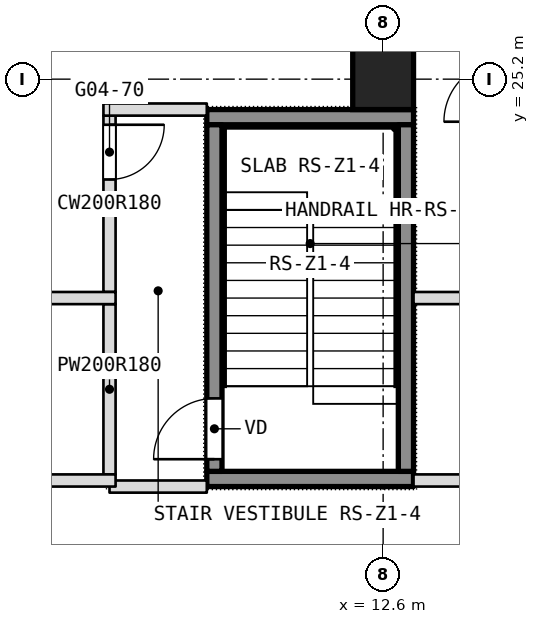
"""IFC4 building model, lengths in metres.
Left out: names, types, materials, properties, quantities, classifications, styles, units other than length and angle.
Written with IfcOpenShell. Run it as: python <this file> out.ifc"""

import sys

from ifc_helpers import new_model, si_unit, direction, frame, frame_2d, origin, origin_2d, place, context, subcontext, project, spatial, rectangle, extrude, element, fill, save


model = new_model("IFC4")
c1 = context("Model", 3, precision=1e-05, world=origin(), true_north=direction((0.0, 1.0)))
c2 = subcontext(c1, "Body", "Model", "MODEL_VIEW")
j1 = project(units=[si_unit("LENGTHUNIT", "METRE"), si_unit("PLANEANGLEUNIT", "RADIAN")], contexts=[c1])
p1 = place(None, origin())
s1 = spatial("IfcSite", under=j1, at=p1, CompositionType="ELEMENT")
p2 = place(p1, origin())
s2 = spatial("IfcBuilding", under=s1, at=p2, CompositionType="ELEMENT")
p3 = place(p2, frame((0.0, 0.0, 58.1)))
s3 = spatial("IfcBuildingStorey", under=s2, at=p3, CompositionType="ELEMENT", Elevation=58.1)
p4 = place(p3, frame((12.6, 25.2, 0.0), z_axis=(0.0, 0.0, 1.0), x_axis=(1.0, 0.0, 0.0)))
e1 = element("IfcColumn", 1, at=p4, inside=s3, PredefinedType="COLUMN", context=c2, shape_type="SweptSolid", body=[
    extrude(rectangle(XDim=1.0, YDim=1.0, at=origin_2d()), origin(), (0.0, 0.0, 1.0), 3.6),
])
p5 = place(p3, frame((8.1, 18.7, 0.0), z_axis=(0.0, 0.0, 1.0), x_axis=(0.0, 1.0, 0.0)))
e2 = element("IfcWall", 2, at=p5, inside=s3, PredefinedType="PARTITIONING", context=c2, shape_type="SweptSolid", body=[
    extrude(rectangle(XDim=2.8, YDim=0.2, at=frame_2d((1.4, 0.0))), origin(), (0.0, 0.0, 1.0), 3.34),
])
p6 = place(p3, frame((8.1, 21.7, 0.0), z_axis=(0.0, 0.0, 1.0), x_axis=(0.0, 1.0, 0.0)))
e3 = element("IfcWall", 3, at=p6, inside=s3, PredefinedType="PARTITIONING", context=c2, shape_type="SweptSolid", body=[
    extrude(rectangle(XDim=2.9, YDim=0.2, at=frame_2d((1.45, 0.0))), origin(), (0.0, 0.0, 1.0), 3.34),
])
p7 = place(p6, frame((1.85, 0.0, 0.0)))
e4 = element("IfcOpeningElement", 4, at=p7, cuts=e3, PredefinedType="OPENING", context=c2, shape_type="SweptSolid", body=[
    extrude(rectangle(XDim=0.9, YDim=2.1, at=frame_2d((0.45, 1.05))), frame((0.0, 0.1, 0.0), z_axis=(0.0, -1.0, 0.0), x_axis=(1.0, 0.0, 0.0)), (0.0, 0.0, 1.0), 0.2),
])
p8 = place(p3, frame((8.1, 18.5, 0.0), z_axis=(0.0, 0.0, 1.0), x_axis=(1.0, 0.0, 0.0)))
e5 = element("IfcWall", 5, at=p8, inside=s3, PredefinedType="PARTITIONING", context=c2, shape_type="SweptSolid", body=[
    extrude(rectangle(XDim=1.6, YDim=0.2, at=frame_2d((0.8, 0.0))), origin(), (0.0, 0.0, 1.0), 3.34),
])
p9 = place(p3, frame((-16.9, 18.6, 0.0), z_axis=(0.0, 0.0, 1.0), x_axis=(1.0, 0.0, 0.0)))
e6 = element("IfcWall", 6, at=p9, inside=s3, PredefinedType="PARTITIONING", context=c2, shape_type="SweptSolid", body=[
    extrude(rectangle(XDim=25.1, YDim=0.2, at=frame_2d((12.55, 0.0))), origin(), (0.0, 0.0, 1.0), 3.34),
])
p10 = place(p9, frame((1.7, 0.0, 0.0)))
e7 = element("IfcOpeningElement", 7, at=p10, cuts=e6, PredefinedType="OPENING", context=c2, shape_type="SweptSolid", body=[
    extrude(rectangle(XDim=1.0, YDim=2.1, at=frame_2d((0.5, 1.05))), frame((0.0, 0.1, 0.0), z_axis=(0.0, -1.0, 0.0), x_axis=(1.0, 0.0, 0.0)), (0.0, 0.0, 1.0), 0.2),
])
p11 = place(p9, frame((16.0, 0.0, 0.0)))
e8 = element("IfcOpeningElement", 8, at=p11, cuts=e6, PredefinedType="OPENING", context=c2, shape_type="SweptSolid", body=[
    extrude(rectangle(XDim=1.8, YDim=2.1, at=frame_2d((0.9, 1.05))), frame((0.0, 0.1, 0.0), z_axis=(0.0, -1.0, 0.0), x_axis=(1.0, 0.0, 0.0)), (0.0, 0.0, 1.0), 0.2),
])
p12 = place(p9, frame((22.55, 0.0, 0.0)))
e9 = element("IfcOpeningElement", 9, at=p12, cuts=e6, PredefinedType="OPENING", context=c2, shape_type="SweptSolid", body=[
    extrude(rectangle(XDim=1.0, YDim=2.1, at=frame_2d((0.5, 1.05))), frame((0.0, 0.1, 0.0), z_axis=(0.0, -1.0, 0.0), x_axis=(1.0, 0.0, 0.0)), (0.0, 0.0, 1.0), 0.2),
])
p13 = place(p9, frame((5.9, 0.0, 0.0)))
e10 = element("IfcOpeningElement", 10, at=p13, cuts=e6, PredefinedType="OPENING", context=c2, shape_type="SweptSolid", body=[
    extrude(rectangle(XDim=1.0, YDim=2.1, at=frame_2d((0.5, 1.05))), frame((0.0, 0.1, 0.0), z_axis=(0.0, -1.0, 0.0), x_axis=(1.0, 0.0, 0.0)), (0.0, 0.0, 1.0), 0.2),
])
p14 = place(p9, frame((10.1, 0.0, 0.0)))
e11 = element("IfcOpeningElement", 11, at=p14, cuts=e6, PredefinedType="OPENING", context=c2, shape_type="SweptSolid", body=[
    extrude(rectangle(XDim=1.0, YDim=2.1, at=frame_2d((0.5, 1.05))), frame((0.0, 0.1, 0.0), z_axis=(0.0, -1.0, 0.0), x_axis=(1.0, 0.0, 0.0)), (0.0, 0.0, 1.0), 0.2),
])
p15 = place(p3, frame((13.1, 18.6, 0.0), z_axis=(0.0, 0.0, 1.0), x_axis=(1.0, 0.0, 0.0)))
e12 = element("IfcWall", 12, at=p15, inside=s3, PredefinedType="PARTITIONING", context=c2, shape_type="SweptSolid", body=[
    extrude(rectangle(XDim=3.8, YDim=0.2, at=frame_2d((1.9, 0.0))), origin(), (0.0, 0.0, 1.0), 3.34),
])
p16 = place(p15, frame((1.35, 0.0, 0.0)))
e13 = element("IfcOpeningElement", 13, at=p16, cuts=e12, PredefinedType="OPENING", context=c2, shape_type="SweptSolid", body=[
    extrude(rectangle(XDim=1.0, YDim=2.1, at=frame_2d((0.5, 1.05))), frame((0.0, 0.1, 0.0), z_axis=(0.0, -1.0, 0.0), x_axis=(1.0, 0.0, 0.0)), (0.0, 0.0, 1.0), 0.2),
])
p17 = place(p3, frame((-16.7, 21.6, 0.0), z_axis=(0.0, 0.0, 1.0), x_axis=(1.0, 0.0, 0.0)))
e14 = element("IfcWall", 14, at=p17, inside=s3, PredefinedType="PARTITIONING", context=c2, shape_type="SweptSolid", body=[
    extrude(rectangle(XDim=24.9, YDim=0.2, at=frame_2d((12.45, 0.0))), origin(), (0.0, 0.0, 1.0), 3.34),
])
p18 = place(p3, frame((13.1, 21.6, 0.0), z_axis=(0.0, 0.0, 1.0), x_axis=(1.0, 0.0, 0.0)))
e15 = element("IfcWall", 15, at=p18, inside=s3, PredefinedType="PARTITIONING", context=c2, shape_type="SweptSolid", body=[
    extrude(rectangle(XDim=3.6, YDim=0.2, at=frame_2d((1.8, 0.0))), origin(), (0.0, 0.0, 1.0), 3.34),
])
p19 = place(p3, frame((8.0, 24.7, 0.0), z_axis=(0.0, 0.0, 1.0), x_axis=(1.0, 0.0, 0.0)))
e16 = element("IfcWall", 16, at=p19, inside=s3, PredefinedType="PARTITIONING", context=c2, shape_type="SweptSolid", body=[
    extrude(rectangle(XDim=1.7, YDim=0.2, at=frame_2d((0.85, 0.0))), origin(), (0.0, 0.0, 1.0), 3.34),
])
for number, where, z_axis, x_axis in (
    (17, (9.7, 18.625, 0.1), (0.0, 0.0, 1.0), (1.0, 0.0, 0.0)),
    (18, (9.7, 24.575, 0.1), (0.0, 0.0, 1.0), (1.0, 0.0, 0.0)),
):
    element("IfcWall", number, at=place(p3, frame(where, z_axis=z_axis, x_axis=x_axis)), inside=s3, PredefinedType="SHEAR", context=c2, shape_type="SweptSolid", body=[
        extrude(rectangle(XDim=3.4, YDim=0.25, at=frame_2d((1.7, 0.0))), origin(), (0.0, 0.0, 1.0), 3.6),
    ])
p20 = place(p3, frame((9.825, 18.75, 0.1), z_axis=(0.0, 0.0, 1.0), x_axis=(0.0, 1.0, 0.0)))
e19 = element("IfcWall", 19, at=p20, inside=s3, PredefinedType="SHEAR", context=c2, shape_type="SweptSolid", body=[
    extrude(rectangle(XDim=5.7, YDim=0.25, at=frame_2d((2.85, 0.0))), origin(), (0.0, 0.0, 1.0), 3.6),
])
p21 = place(p20, frame((0.2, 0.0, 0.0)))
e20 = element("IfcOpeningElement", 20, at=p21, cuts=e19, PredefinedType="OPENING", context=c2, shape_type="SweptSolid", body=[
    extrude(rectangle(XDim=1.0, YDim=2.1, at=frame_2d((0.5, 1.05))), frame((0.0, 0.125, 0.0), z_axis=(0.0, -1.0, 0.0), x_axis=(1.0, 0.0, 0.0)), (0.0, 0.0, 1.0), 0.25),
])
p22 = place(p3, frame((12.975, 18.75, 0.1), z_axis=(0.0, 0.0, 1.0), x_axis=(0.0, 1.0, 0.0)))
e21 = element("IfcWall", 21, at=p22, inside=s3, PredefinedType="SHEAR", context=c2, shape_type="SweptSolid", body=[
    extrude(rectangle(XDim=5.7, YDim=0.25, at=frame_2d((2.85, 0.0))), origin(), (0.0, 0.0, 1.0), 3.6),
])
p23 = place(p7, origin())
e22 = element("IfcDoor", 22, at=p23, inside=s3, OperationType="SINGLE_SWING_LEFT", PredefinedType="DOOR", context=c2, shape_type="SweptSolid", body=[
    extrude(rectangle(XDim=0.9, YDim=2.1, at=frame_2d((0.45, 1.05))), frame((0.0, 0.025, 0.0), z_axis=(0.0, -1.0, 0.0), x_axis=(1.0, 0.0, 0.0)), (0.0, 0.0, 1.0), 0.05),
])
fill(e4, e22)
p24 = place(p21, origin())
e23 = element("IfcDoor", 23, at=p24, inside=s3, OperationType="SINGLE_SWING_LEFT", PredefinedType="DOOR", context=c2, shape_type="SweptSolid", body=[
    extrude(rectangle(XDim=1.0, YDim=2.1, at=frame_2d((0.5, 1.05))), frame((0.0, 0.025, 0.0), z_axis=(0.0, -1.0, 0.0), x_axis=(1.0, 0.0, 0.0)), (0.0, 0.0, 1.0), 0.05),
])
fill(e20, e23)
save(model, sys.argv[1])
